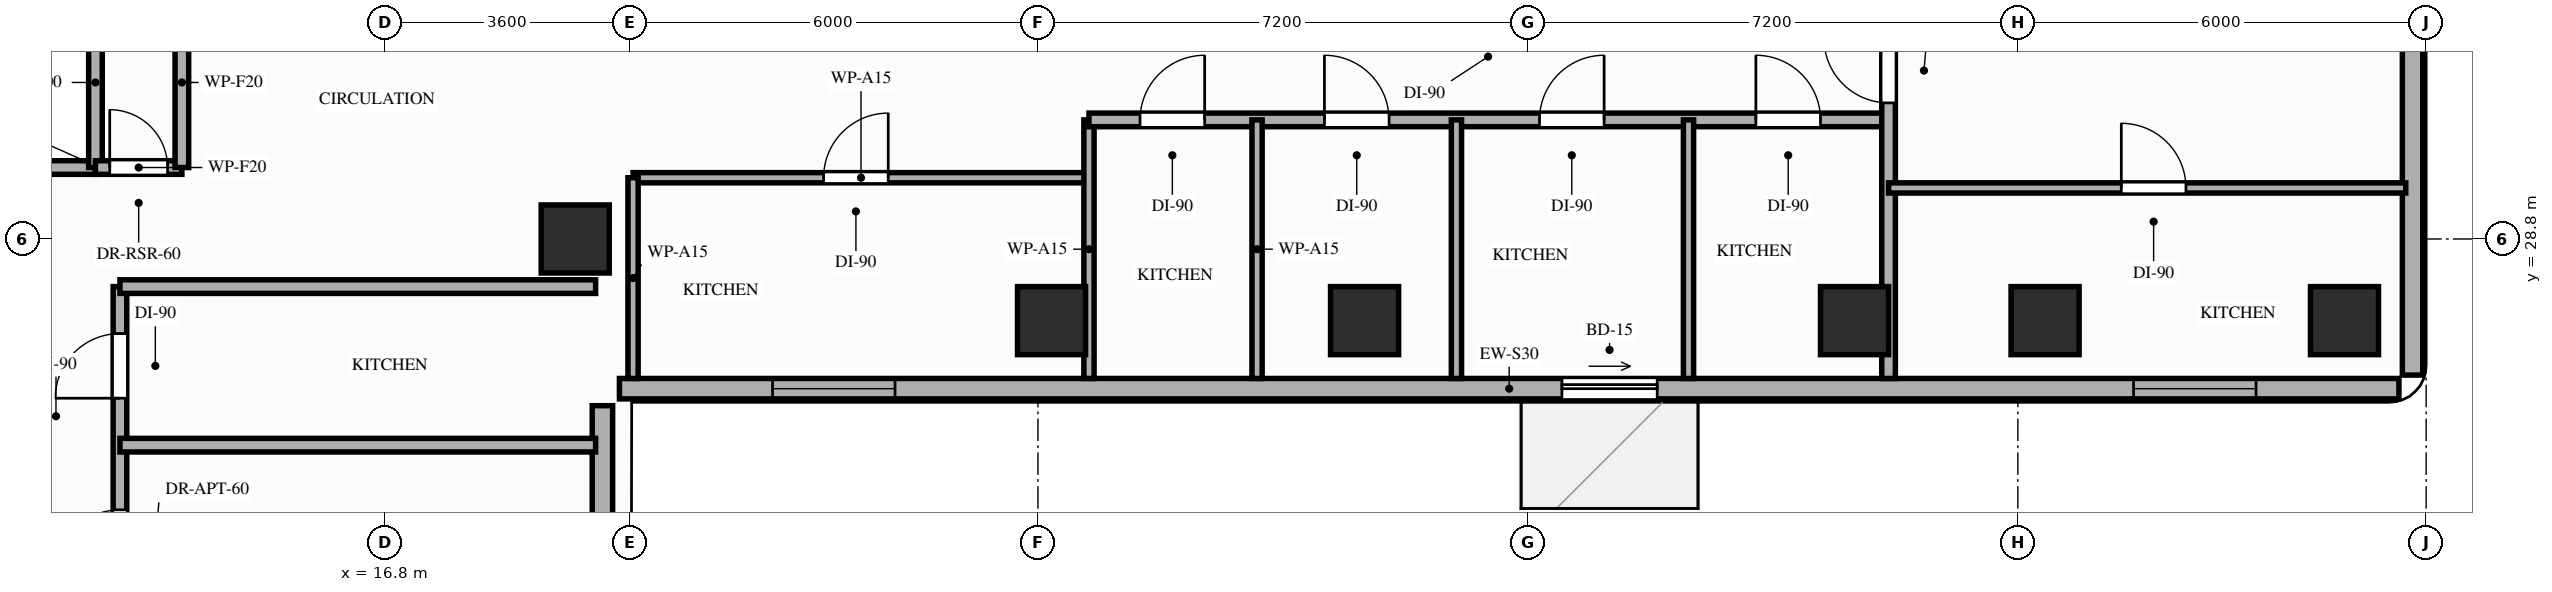
"""IFC4 building model, lengths in metres.
Left out: names, types, materials, properties, quantities, classifications, styles, units other than length and angle.
Written with IfcOpenShell. Run it as: python <this file> out.ifc"""

import sys

from ifc_helpers import new_model, si_unit, direction, frame, frame_2d, origin, origin_2d, place, context, subcontext, project, spatial, rectangle, extrude, element, fill, save


model = new_model("IFC4")
c1 = context("Model", 3, precision=1e-05, world=origin(), true_north=direction((0.0, 1.0)))
c2 = subcontext(c1, "Body", "Model", "MODEL_VIEW")
j1 = project(units=[si_unit("LENGTHUNIT", "METRE"), si_unit("PLANEANGLEUNIT", "RADIAN")], contexts=[c1])
p1 = place(None, origin())
s1 = spatial("IfcSite", under=j1, at=p1, CompositionType="ELEMENT")
p2 = place(p1, origin())
s2 = spatial("IfcBuilding", under=s1, at=p2, CompositionType="ELEMENT")
p3 = place(p2, frame((0.0, 0.0, 120.2)))
s3 = spatial("IfcBuildingStorey", under=s2, at=p3, CompositionType="ELEMENT", Elevation=120.2)
for number, where, z_axis, x_axis in (
    (1, (19.6, 28.8, 0.0), (0.0, 0.0, 1.0), (1.0, 0.0, 0.0)),
    (2, (26.6, 27.6, 0.0), (0.0, 0.0, 1.0), (1.0, 0.0, 0.0)),
    (3, (31.2, 27.6, 0.0), (0.0, 0.0, 1.0), (1.0, 0.0, 0.0)),
    (4, (38.4, 27.6, 0.0), (0.0, 0.0, 1.0), (1.0, 0.0, 0.0)),
    (5, (41.2, 27.6, 0.0), (0.0, 0.0, 1.0), (1.0, 0.0, 0.0)),
    (6, (45.6, 27.6, 0.0), (0.0, 0.0, 1.0), (1.0, 0.0, 0.0)),
):
    element("IfcColumn", number, at=place(p3, frame(where, z_axis=z_axis, x_axis=x_axis)), inside=s3, PredefinedType="COLUMN", context=c2, shape_type="SweptSolid", body=[
        extrude(rectangle(XDim=1.0, YDim=1.0, at=origin_2d()), origin(), (0.0, 0.0, 1.0), 3.2),
    ])
p4 = place(p3, frame((20.0, 8.8, 0.0), z_axis=(0.0, 0.0, 1.0), x_axis=(0.0, 1.0, 0.0)))
e7 = element("IfcWall", 7, at=p4, inside=s3, PredefinedType="STANDARD", context=c2, shape_type="SweptSolid", body=[
    extrude(rectangle(XDim=17.55, YDim=0.3, at=frame_2d((8.775, 0.0))), origin(), (0.0, 0.0, 1.0), 2.41),
])
p5 = place(p4, frame((12.6, 0.0, 0.85)))
e8 = element("IfcOpeningElement", 8, at=p5, cuts=e7, PredefinedType="OPENING", context=c2, shape_type="SweptSolid", body=[
    extrude(rectangle(XDim=1.1, YDim=1.31, at=frame_2d((0.55, 0.655))), frame((0.0, 0.16, 0.0), z_axis=(0.0, -1.0, 0.0), x_axis=(1.0, 0.0, 0.0)), (0.0, 0.0, 1.0), 0.32),
])
p6 = place(p4, frame((5.6, 0.0, 0.85)))
e9 = element("IfcOpeningElement", 9, at=p6, cuts=e7, PredefinedType="OPENING", context=c2, shape_type="SweptSolid", body=[
    extrude(rectangle(XDim=1.8, YDim=1.31, at=frame_2d((0.9, 0.655))), frame((0.0, 0.16, 0.0), z_axis=(0.0, -1.0, 0.0), x_axis=(1.0, 0.0, 0.0)), (0.0, 0.0, 1.0), 0.32),
])
p7 = place(p3, frame((20.25, 26.6, 0.0), z_axis=(0.0, 0.0, 1.0), x_axis=(1.0, 0.0, 0.0)))
e10 = element("IfcWall", 10, at=p7, inside=s3, PredefinedType="STANDARD", context=c2, shape_type="SweptSolid", body=[
    extrude(rectangle(XDim=26.15, YDim=0.3, at=frame_2d((13.075, 0.0))), origin(), (0.0, 0.0, 1.0), 2.71),
])
p8 = place(p7, frame((13.85, 0.0, 0.0)))
e11 = element("IfcOpeningElement", 11, at=p8, cuts=e10, PredefinedType="OPENING", context=c2, shape_type="SweptSolid", body=[
    extrude(rectangle(XDim=1.4, YDim=2.1, at=frame_2d((0.7, 1.05))), frame((0.0, 0.16, 0.0), z_axis=(0.0, -1.0, 0.0), x_axis=(1.0, 0.0, 0.0)), (0.0, 0.0, 1.0), 0.32),
])
p9 = place(p7, frame((2.25, 0.0, 0.85)))
e12 = element("IfcOpeningElement", 12, at=p9, cuts=e10, PredefinedType="OPENING", context=c2, shape_type="SweptSolid", body=[
    extrude(rectangle(XDim=1.8, YDim=1.61, at=frame_2d((0.9, 0.805))), frame((0.0, 0.16, 0.0), z_axis=(0.0, -1.0, 0.0), x_axis=(1.0, 0.0, 0.0)), (0.0, 0.0, 1.0), 0.32),
])
p10 = place(p7, frame((22.25, 0.0, 0.85)))
e13 = element("IfcOpeningElement", 13, at=p10, cuts=e10, PredefinedType="OPENING", context=c2, shape_type="SweptSolid", body=[
    extrude(rectangle(XDim=1.8, YDim=1.61, at=frame_2d((0.9, 0.805))), frame((0.0, 0.16, 0.0), z_axis=(0.0, -1.0, 0.0), x_axis=(1.0, 0.0, 0.0)), (0.0, 0.0, 1.0), 0.32),
])
p11 = place(p3, frame((46.6, 26.8, 0.0), z_axis=(0.0, 0.0, 1.0), x_axis=(0.0, 1.0, 0.0)))
e14 = element("IfcWall", 14, at=p11, inside=s3, PredefinedType="STANDARD", context=c2, shape_type="SweptSolid", body=[
    extrude(rectangle(XDim=15.35, YDim=0.3, at=frame_2d((7.675, 0.0))), origin(), (0.0, 0.0, 1.0), 3.02),
])
p12 = place(p11, frame((6.13, 0.0, 0.85)))
e15 = element("IfcOpeningElement", 15, at=p12, cuts=e14, PredefinedType="OPENING", context=c2, shape_type="SweptSolid", body=[
    extrude(rectangle(XDim=1.8, YDim=1.75, at=frame_2d((0.9, 0.875))), frame((0.0, 0.16, 0.0), z_axis=(0.0, -1.0, 0.0), x_axis=(1.0, 0.0, 0.0)), (0.0, 0.0, 1.0), 0.32),
])
p13 = place(p3, frame((7.0, 29.85, 0.0), z_axis=(0.0, 0.0, 1.0), x_axis=(1.0, 0.0, 0.0)))
e16 = element("IfcWall", 16, at=p13, inside=s3, PredefinedType="MOVABLE", context=c2, shape_type="SweptSolid", body=[
    extrude(rectangle(XDim=5.55, YDim=0.2, at=frame_2d((2.775, 0.0))), origin(), (0.0, 0.0, 1.0), 3.02),
])
p14 = place(p3, frame((12.55, 29.85, 0.0), z_axis=(0.0, 0.0, 1.0), x_axis=(0.0, 1.0, 0.0)))
e17 = element("IfcWall", 17, at=p14, inside=s3, PredefinedType="MOVABLE", context=c2, shape_type="SweptSolid", body=[
    extrude(rectangle(XDim=2.5, YDim=0.2, at=frame_2d((1.25, 0.0))), origin(), (0.0, 0.0, 1.0), 3.02),
])
p15 = place(p3, frame((12.55, 29.85, 0.0), z_axis=(0.0, 0.0, 1.0), x_axis=(1.0, 0.0, 0.0)))
e18 = element("IfcWall", 18, at=p15, inside=s3, PredefinedType="PARTITIONING", context=c2, shape_type="SweptSolid", body=[
    extrude(rectangle(XDim=1.27, YDim=0.2, at=frame_2d((0.635, 0.0))), origin(), (0.0, 0.0, 1.0), 3.02),
])
p16 = place(p15, frame((0.21, 0.0, 0.0)))
e19 = element("IfcOpeningElement", 19, at=p16, cuts=e18, PredefinedType="OPENING", context=c2, shape_type="SweptSolid", body=[
    extrude(rectangle(XDim=0.85, YDim=2.05, at=frame_2d((0.425, 1.025))), frame((0.0, 0.11, 0.0), z_axis=(0.0, -1.0, 0.0), x_axis=(1.0, 0.0, 0.0)), (0.0, 0.0, 1.0), 0.22),
])
p17 = place(p3, frame((13.82, 29.85, 0.0), z_axis=(0.0, 0.0, 1.0), x_axis=(0.0, 1.0, 0.0)))
e20 = element("IfcWall", 20, at=p17, inside=s3, PredefinedType="PARTITIONING", context=c2, shape_type="SweptSolid", body=[
    extrude(rectangle(XDim=2.5, YDim=0.2, at=frame_2d((1.25, 0.0))), origin(), (0.0, 0.0, 1.0), 3.02),
])
p18 = place(p3, frame((12.91, 16.6, 0.0), z_axis=(0.0, 0.0, 1.0), x_axis=(0.0, 1.0, 0.0)))
e21 = element("IfcWall", 21, at=p18, inside=s3, PredefinedType="PARTITIONING", context=c2, shape_type="SweptSolid", body=[
    extrude(rectangle(XDim=11.5, YDim=0.2, at=frame_2d((5.75, 0.0))), origin(), (0.0, 0.0, 1.0), 2.41),
])
p19 = place(p18, frame((0.45, 0.0, 0.0)))
e22 = element("IfcOpeningElement", 22, at=p19, cuts=e21, PredefinedType="OPENING", context=c2, shape_type="SweptSolid", body=[
    extrude(rectangle(XDim=0.95, YDim=2.15, at=frame_2d((0.475, 1.075))), frame((0.0, 0.11, 0.0), z_axis=(0.0, -1.0, 0.0), x_axis=(1.0, 0.0, 0.0)), (0.0, 0.0, 1.0), 0.22),
])
p20 = place(p18, frame((2.75, 0.0, 0.0)))
e23 = element("IfcOpeningElement", 23, at=p20, cuts=e21, PredefinedType="OPENING", context=c2, shape_type="SweptSolid", body=[
    extrude(rectangle(XDim=0.95, YDim=2.1, at=frame_2d((0.475, 1.05))), frame((0.0, 0.11, 0.0), z_axis=(0.0, -1.0, 0.0), x_axis=(1.0, 0.0, 0.0)), (0.0, 0.0, 1.0), 0.22),
])
p21 = place(p18, frame((9.86, 0.0, 0.0)))
e24 = element("IfcOpeningElement", 24, at=p21, cuts=e21, PredefinedType="OPENING", context=c2, shape_type="SweptSolid", body=[
    extrude(rectangle(XDim=0.95, YDim=2.15, at=frame_2d((0.475, 1.075))), frame((0.0, 0.11, 0.0), z_axis=(0.0, -1.0, 0.0), x_axis=(1.0, 0.0, 0.0)), (0.0, 0.0, 1.0), 0.22),
])
p22 = place(p18, frame((7.27, 0.0, 0.0)))
e25 = element("IfcOpeningElement", 25, at=p22, cuts=e21, PredefinedType="OPENING", context=c2, shape_type="SweptSolid", body=[
    extrude(rectangle(XDim=0.95, YDim=2.15, at=frame_2d((0.475, 1.075))), frame((0.0, 0.11, 0.0), z_axis=(0.0, -1.0, 0.0), x_axis=(1.0, 0.0, 0.0)), (0.0, 0.0, 1.0), 0.22),
])
p23 = place(p3, frame((12.91, 28.1, 0.0), z_axis=(0.0, 0.0, 1.0), x_axis=(1.0, 0.0, 0.0)))
e26 = element("IfcWall", 26, at=p23, inside=s3, PredefinedType="PARTITIONING", context=c2, shape_type="SweptSolid", body=[
    extrude(rectangle(XDim=6.99, YDim=0.2, at=frame_2d((3.495, 0.0))), origin(), (0.0, 0.0, 1.0), 2.41),
])
p24 = place(p3, frame((20.45, 29.7, 0.0), z_axis=(0.0, 0.0, 1.0), x_axis=(1.0, 0.0, 0.0)))
e27 = element("IfcWall", 27, at=p24, inside=s3, PredefinedType="PARTITIONING", context=c2, shape_type="SweptSolid", body=[
    extrude(rectangle(XDim=6.7, YDim=0.15, at=frame_2d((3.35, 0.0))), origin(), (0.0, 0.0, 1.0), 3.02),
])
p25 = place(p24, frame((2.8, 0.0, 0.0)))
e28 = element("IfcOpeningElement", 28, at=p25, cuts=e27, PredefinedType="OPENING", context=c2, shape_type="SweptSolid", body=[
    extrude(rectangle(XDim=0.95, YDim=2.15, at=frame_2d((0.475, 1.075))), frame((0.0, 0.085, 0.0), z_axis=(0.0, -1.0, 0.0), x_axis=(1.0, 0.0, 0.0)), (0.0, 0.0, 1.0), 0.17),
])
p26 = place(p3, frame((20.45, 26.75, 0.0), z_axis=(0.0, 0.0, 1.0), x_axis=(0.0, 1.0, 0.0)))
e29 = element("IfcWall", 29, at=p26, inside=s3, PredefinedType="PARTITIONING", context=c2, shape_type="SweptSolid", body=[
    extrude(rectangle(XDim=2.95, YDim=0.15, at=frame_2d((1.475, 0.0))), origin(), (0.0, 0.0, 1.0), 2.41),
])
p27 = place(p3, frame((27.15, 26.75, 0.0), z_axis=(0.0, 0.0, 1.0), x_axis=(0.0, 1.0, 0.0)))
e30 = element("IfcWall", 30, at=p27, inside=s3, PredefinedType="PARTITIONING", context=c2, shape_type="SweptSolid", body=[
    extrude(rectangle(XDim=3.8, YDim=0.15, at=frame_2d((1.9, 0.0))), origin(), (0.0, 0.0, 1.0), 2.41),
])
p28 = place(p3, frame((12.91, 25.77, 0.0), z_axis=(0.0, 0.0, 1.0), x_axis=(1.0, 0.0, 0.0)))
e31 = element("IfcWall", 31, at=p28, inside=s3, PredefinedType="PARTITIONING", context=c2, shape_type="SweptSolid", body=[
    extrude(rectangle(XDim=6.99, YDim=0.2, at=frame_2d((3.495, 0.0))), origin(), (0.0, 0.0, 1.0), 2.41),
])
p29 = place(p3, frame((27.15, 30.55, 0.0), z_axis=(0.0, 0.0, 1.0), x_axis=(1.0, 0.0, 0.0)))
e32 = element("IfcWall", 32, at=p29, inside=s3, PredefinedType="PARTITIONING", context=c2, shape_type="SweptSolid", body=[
    extrude(rectangle(XDim=11.75, YDim=0.2, at=frame_2d((5.875, 0.0))), origin(), (0.0, 0.0, 1.0), 2.41),
])
p30 = place(p29, frame((0.75, 0.0, 0.0)))
e33 = element("IfcOpeningElement", 33, at=p30, cuts=e32, PredefinedType="OPENING", context=c2, shape_type="SweptSolid", body=[
    extrude(rectangle(XDim=0.95, YDim=2.15, at=frame_2d((0.475, 1.075))), frame((0.0, 0.11, 0.0), z_axis=(0.0, -1.0, 0.0), x_axis=(1.0, 0.0, 0.0)), (0.0, 0.0, 1.0), 0.22),
])
p31 = place(p29, frame((3.46, 0.0, 0.0)))
e34 = element("IfcOpeningElement", 34, at=p31, cuts=e32, PredefinedType="OPENING", context=c2, shape_type="SweptSolid", body=[
    extrude(rectangle(XDim=0.95, YDim=2.15, at=frame_2d((0.475, 1.075))), frame((0.0, 0.11, 0.0), z_axis=(0.0, -1.0, 0.0), x_axis=(1.0, 0.0, 0.0)), (0.0, 0.0, 1.0), 0.22),
])
p32 = place(p29, frame((6.62, 0.0, 0.0)))
e35 = element("IfcOpeningElement", 35, at=p32, cuts=e32, PredefinedType="OPENING", context=c2, shape_type="SweptSolid", body=[
    extrude(rectangle(XDim=0.95, YDim=2.15, at=frame_2d((0.475, 1.075))), frame((0.0, 0.11, 0.0), z_axis=(0.0, -1.0, 0.0), x_axis=(1.0, 0.0, 0.0)), (0.0, 0.0, 1.0), 0.22),
])
p33 = place(p29, frame((9.8, 0.0, 0.0)))
e36 = element("IfcOpeningElement", 36, at=p33, cuts=e32, PredefinedType="OPENING", context=c2, shape_type="SweptSolid", body=[
    extrude(rectangle(XDim=0.95, YDim=2.15, at=frame_2d((0.475, 1.075))), frame((0.0, 0.11, 0.0), z_axis=(0.0, -1.0, 0.0), x_axis=(1.0, 0.0, 0.0)), (0.0, 0.0, 1.0), 0.22),
])
p34 = place(p3, frame((38.9, 26.75, 0.0), z_axis=(0.0, 0.0, 1.0), x_axis=(0.0, 1.0, 0.0)))
e37 = element("IfcWall", 37, at=p34, inside=s3, PredefinedType="PARTITIONING", context=c2, shape_type="SweptSolid", body=[
    extrude(rectangle(XDim=15.45, YDim=0.2, at=frame_2d((7.725, 0.0))), origin(), (0.0, 0.0, 1.0), 2.41),
])
p35 = place(p34, frame((4.05, 0.0, 0.0)))
e38 = element("IfcOpeningElement", 38, at=p35, cuts=e37, PredefinedType="OPENING", context=c2, shape_type="SweptSolid", body=[
    extrude(rectangle(XDim=0.95, YDim=2.15, at=frame_2d((0.475, 1.075))), frame((0.0, 0.11, 0.0), z_axis=(0.0, -1.0, 0.0), x_axis=(1.0, 0.0, 0.0)), (0.0, 0.0, 1.0), 0.22),
])
p36 = place(p3, frame((38.9, 29.55, 0.0), z_axis=(0.0, 0.0, 1.0), x_axis=(1.0, 0.0, 0.0)))
e39 = element("IfcWall", 39, at=p36, inside=s3, PredefinedType="PARTITIONING", context=c2, shape_type="SweptSolid", body=[
    extrude(rectangle(XDim=7.6, YDim=0.15, at=frame_2d((3.8, 0.0))), origin(), (0.0, 0.0, 1.0), 2.41),
])
p37 = place(p36, frame((3.42, 0.0, 0.0)))
e40 = element("IfcOpeningElement", 40, at=p37, cuts=e39, PredefinedType="OPENING", context=c2, shape_type="SweptSolid", body=[
    extrude(rectangle(XDim=0.95, YDim=2.15, at=frame_2d((0.475, 1.075))), frame((0.0, 0.085, 0.0), z_axis=(0.0, -1.0, 0.0), x_axis=(1.0, 0.0, 0.0)), (0.0, 0.0, 1.0), 0.17),
])
for number, where, z_axis, x_axis in (
    (41, (29.62, 26.75, 0.0), (0.0, 0.0, 1.0), (0.0, 1.0, 0.0)),
    (42, (32.55, 26.75, 0.0), (0.0, 0.0, 1.0), (0.0, 1.0, 0.0)),
    (43, (35.96, 26.75, 0.0), (0.0, 0.0, 1.0), (0.0, 1.0, 0.0)),
):
    element("IfcWall", number, at=place(p3, frame(where, z_axis=z_axis, x_axis=x_axis)), inside=s3, PredefinedType="PARTITIONING", context=c2, shape_type="SweptSolid", body=[
        extrude(rectangle(XDim=3.8, YDim=0.15, at=frame_2d((1.9, 0.0))), origin(), (0.0, 0.0, 1.0), 2.41),
    ])
p38 = place(p8, origin())
e44 = element("IfcDoor", 44, at=p38, inside=s3, OperationType="SLIDING_TO_RIGHT", PredefinedType="DOOR", context=c2, shape_type="SweptSolid", body=[
    extrude(rectangle(XDim=1.4, YDim=2.1, at=frame_2d((0.7, 1.05))), frame((0.0, 0.025, 0.0), z_axis=(0.0, -1.0, 0.0), x_axis=(1.0, 0.0, 0.0)), (0.0, 0.0, 1.0), 0.05),
])
fill(e11, e44)
p39 = place(p9, origin())
e45 = element("IfcWindow", 45, at=p39, inside=s3, PartitioningType="SINGLE_PANEL", PredefinedType="WINDOW", context=c2, shape_type="SweptSolid", body=[
    extrude(rectangle(XDim=1.8, YDim=1.61, at=frame_2d((0.9, 0.805))), frame((0.0, 0.03, 0.0), z_axis=(0.0, -1.0, 0.0), x_axis=(1.0, 0.0, 0.0)), (0.0, 0.0, 1.0), 0.06),
])
fill(e12, e45)
p40 = place(p10, origin())
e46 = element("IfcWindow", 46, at=p40, inside=s3, PartitioningType="SINGLE_PANEL", PredefinedType="WINDOW", context=c2, shape_type="SweptSolid", body=[
    extrude(rectangle(XDim=1.8, YDim=1.61, at=frame_2d((0.9, 0.805))), frame((0.0, 0.03, 0.0), z_axis=(0.0, -1.0, 0.0), x_axis=(1.0, 0.0, 0.0)), (0.0, 0.0, 1.0), 0.06),
])
fill(e13, e46)
p41 = place(p16, origin())
e47 = element("IfcDoor", 47, at=p41, inside=s3, OperationType="SINGLE_SWING_LEFT", PredefinedType="DOOR", context=c2, shape_type="SweptSolid", body=[
    extrude(rectangle(XDim=0.85, YDim=2.05, at=frame_2d((0.425, 1.025))), frame((0.0, 0.025, 0.0), z_axis=(0.0, -1.0, 0.0), x_axis=(1.0, 0.0, 0.0)), (0.0, 0.0, 1.0), 0.05),
])
fill(e19, e47)
p42 = place(p25, origin())
e48 = element("IfcDoor", 48, at=p42, inside=s3, OperationType="SINGLE_SWING_RIGHT", PredefinedType="DOOR", context=c2, shape_type="SweptSolid", body=[
    extrude(rectangle(XDim=0.95, YDim=2.15, at=frame_2d((0.475, 1.075))), frame((0.0, 0.025, 0.0), z_axis=(0.0, -1.0, 0.0), x_axis=(1.0, 0.0, 0.0)), (0.0, 0.0, 1.0), 0.05),
])
fill(e28, e48)
p43 = place(p21, origin())
e49 = element("IfcDoor", 49, at=p43, inside=s3, OperationType="SINGLE_SWING_LEFT", PredefinedType="DOOR", context=c2, shape_type="SweptSolid", body=[
    extrude(rectangle(XDim=0.95, YDim=2.15, at=frame_2d((0.475, 1.075))), frame((0.0, 0.025, 0.0), z_axis=(0.0, -1.0, 0.0), x_axis=(1.0, 0.0, 0.0)), (0.0, 0.0, 1.0), 0.05),
])
fill(e24, e49)
p44 = place(p22, origin())
e50 = element("IfcDoor", 50, at=p44, inside=s3, OperationType="SINGLE_SWING_LEFT", PredefinedType="DOOR", context=c2, shape_type="SweptSolid", body=[
    extrude(rectangle(XDim=0.95, YDim=2.15, at=frame_2d((0.475, 1.075))), frame((0.0, 0.025, 0.0), z_axis=(0.0, -1.0, 0.0), x_axis=(1.0, 0.0, 0.0)), (0.0, 0.0, 1.0), 0.05),
])
fill(e25, e50)
p45 = place(p35, origin())
e51 = element("IfcDoor", 51, at=p45, inside=s3, OperationType="SINGLE_SWING_RIGHT", PredefinedType="DOOR", context=c2, shape_type="SweptSolid", body=[
    extrude(rectangle(XDim=0.95, YDim=2.15, at=frame_2d((0.475, 1.075))), frame((0.0, 0.025, 0.0), z_axis=(0.0, -1.0, 0.0), x_axis=(1.0, 0.0, 0.0)), (0.0, 0.0, 1.0), 0.05),
])
fill(e38, e51)
p46 = place(p37, origin())
e52 = element("IfcDoor", 52, at=p46, inside=s3, OperationType="SINGLE_SWING_LEFT", PredefinedType="DOOR", context=c2, shape_type="SweptSolid", body=[
    extrude(rectangle(XDim=0.95, YDim=2.15, at=frame_2d((0.475, 1.075))), frame((0.0, 0.025, 0.0), z_axis=(0.0, -1.0, 0.0), x_axis=(1.0, 0.0, 0.0)), (0.0, 0.0, 1.0), 0.05),
])
fill(e40, e52)
p47 = place(p30, origin())
e53 = element("IfcDoor", 53, at=p47, inside=s3, OperationType="SINGLE_SWING_RIGHT", PredefinedType="DOOR", context=c2, shape_type="SweptSolid", body=[
    extrude(rectangle(XDim=0.95, YDim=2.15, at=frame_2d((0.475, 1.075))), frame((0.0, 0.025, 0.0), z_axis=(0.0, -1.0, 0.0), x_axis=(1.0, 0.0, 0.0)), (0.0, 0.0, 1.0), 0.05),
])
fill(e33, e53)
p48 = place(p31, origin())
e54 = element("IfcDoor", 54, at=p48, inside=s3, OperationType="SINGLE_SWING_LEFT", PredefinedType="DOOR", context=c2, shape_type="SweptSolid", body=[
    extrude(rectangle(XDim=0.95, YDim=2.15, at=frame_2d((0.475, 1.075))), frame((0.0, 0.025, 0.0), z_axis=(0.0, -1.0, 0.0), x_axis=(1.0, 0.0, 0.0)), (0.0, 0.0, 1.0), 0.05),
])
fill(e34, e54)
p49 = place(p32, origin())
e55 = element("IfcDoor", 55, at=p49, inside=s3, OperationType="SINGLE_SWING_RIGHT", PredefinedType="DOOR", context=c2, shape_type="SweptSolid", body=[
    extrude(rectangle(XDim=0.95, YDim=2.15, at=frame_2d((0.475, 1.075))), frame((0.0, 0.025, 0.0), z_axis=(0.0, -1.0, 0.0), x_axis=(1.0, 0.0, 0.0)), (0.0, 0.0, 1.0), 0.05),
])
fill(e35, e55)
p50 = place(p33, origin())
e56 = element("IfcDoor", 56, at=p50, inside=s3, OperationType="SINGLE_SWING_LEFT", PredefinedType="DOOR", context=c2, shape_type="SweptSolid", body=[
    extrude(rectangle(XDim=0.95, YDim=2.15, at=frame_2d((0.475, 1.075))), frame((0.0, 0.025, 0.0), z_axis=(0.0, -1.0, 0.0), x_axis=(1.0, 0.0, 0.0)), (0.0, 0.0, 1.0), 0.05),
])
fill(e36, e56)
save(model, sys.argv[1])
